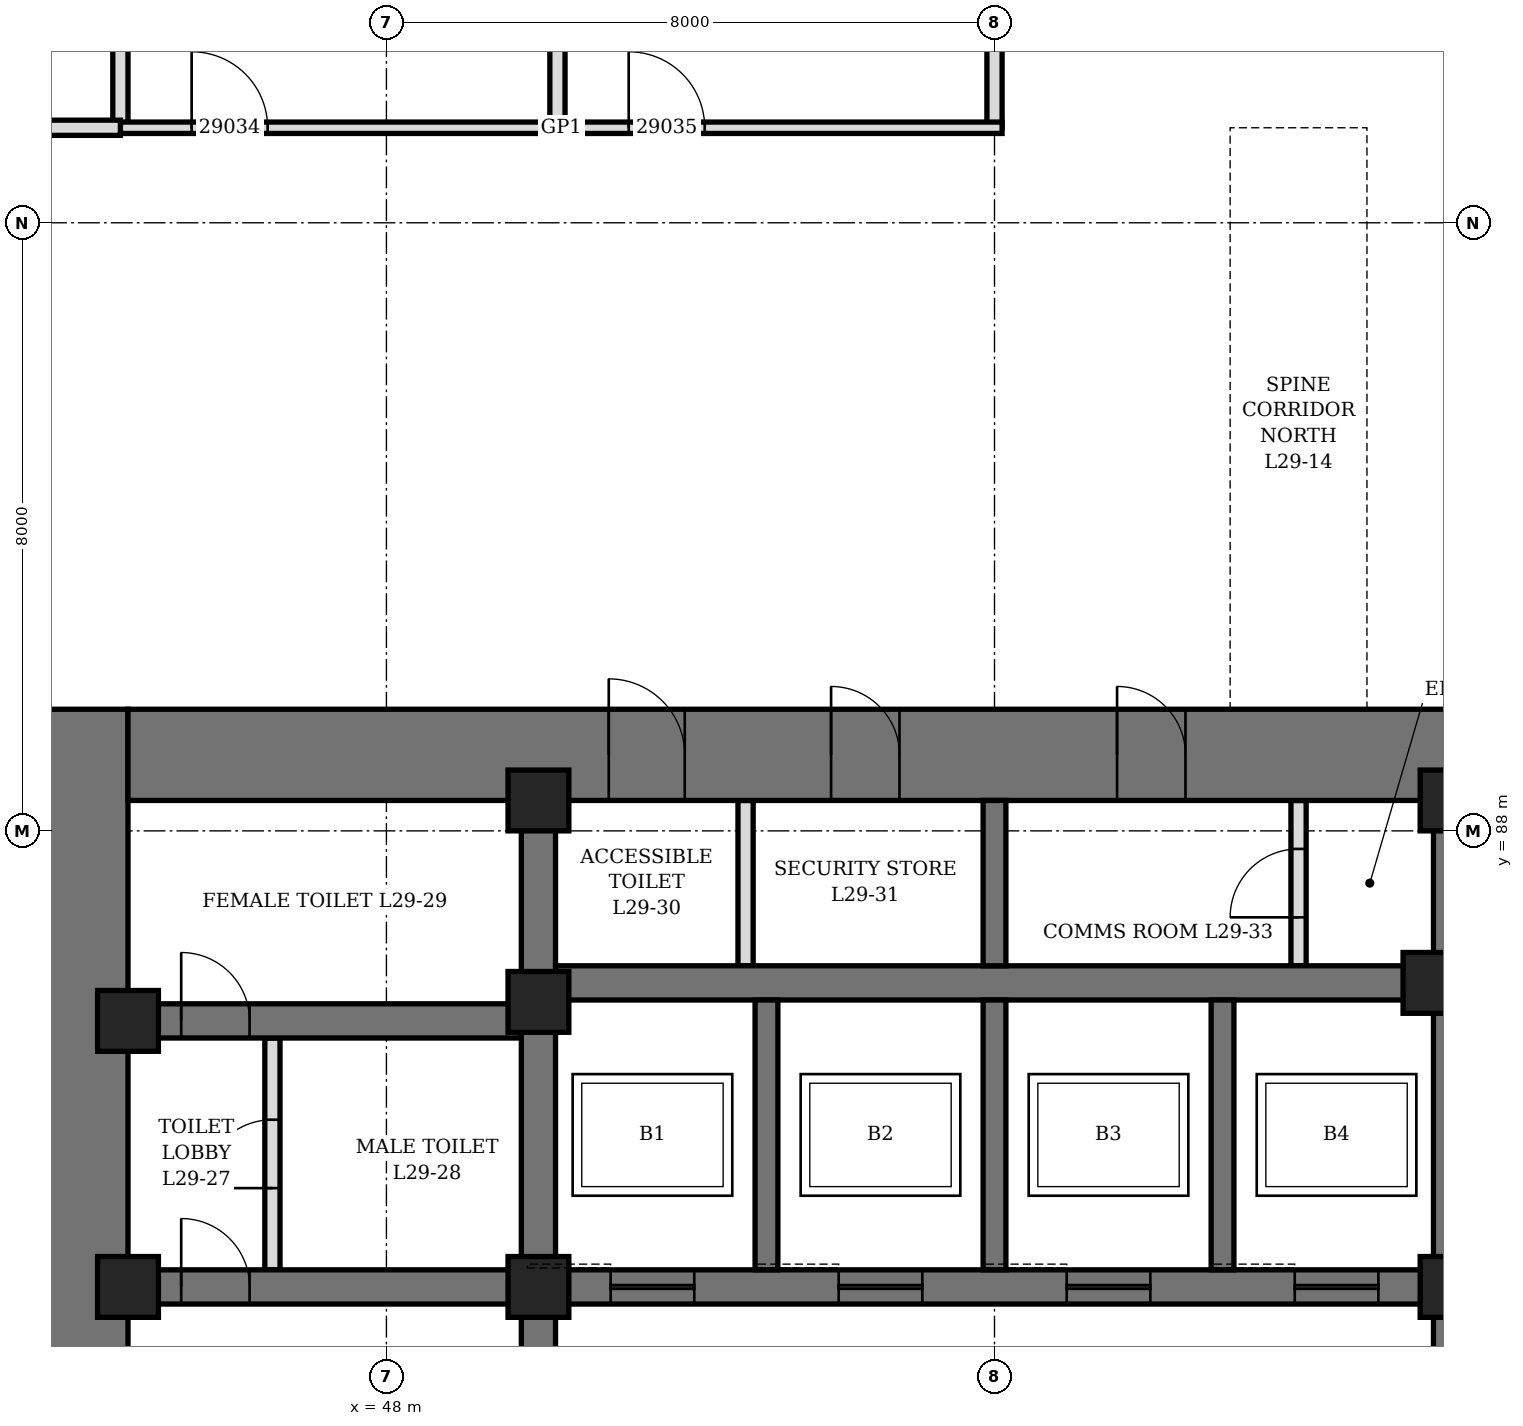
"""IFC4 building model, lengths in metres.
Left out: names, types, materials, properties, quantities, classifications, styles, units other than length and angle.
Written with IfcOpenShell. Run it as: python <this file> out.ifc"""

import sys

from ifc_helpers import new_model, si_unit, direction, frame, frame_2d, origin, origin_2d, place, context, subcontext, project, spatial, rectangle, hollow_rectangle, extrude, element, fill, save


model = new_model("IFC4")
c1 = context("Model", 3, precision=1e-05, world=origin(), true_north=direction((0.0, 1.0)))
c2 = subcontext(c1, "Body", "Model", "MODEL_VIEW")
j1 = project(units=[si_unit("LENGTHUNIT", "METRE"), si_unit("PLANEANGLEUNIT", "RADIAN")], contexts=[c1])
p1 = place(None, origin())
s1 = spatial("IfcSite", under=j1, at=p1, CompositionType="ELEMENT")
p2 = place(p1, origin())
s2 = spatial("IfcBuilding", under=s1, at=p2, CompositionType="ELEMENT")
p3 = place(p2, frame((0.0, 0.0, 133.3)))
s3 = spatial("IfcBuildingStorey", under=s2, at=p3, CompositionType="ELEMENT", Elevation=133.3)
p4 = place(p3, frame((44.0, 70.4, 0.0), z_axis=(0.0, 0.0, 1.0), x_axis=(0.0, 1.0, 0.0)))
e1 = element("IfcWall", 1, at=p4, inside=s3, PredefinedType="SHEAR", context=c2, shape_type="SweptSolid", body=[
    extrude(rectangle(XDim=19.2, YDim=1.2, at=frame_2d((9.6, 0.0))), origin(), (0.0, 0.0, 1.0), 4.2),
])
p5 = place(p4, frame((8.6, 0.0, 0.0)))
e2 = element("IfcOpeningElement", 2, at=p5, cuts=e1, PredefinedType="OPENING", context=c2, shape_type="SweptSolid", body=[
    extrude(rectangle(XDim=2.0, YDim=2.4, at=frame_2d((1.0, 1.2))), frame((0.0, 0.61, 0.0), z_axis=(0.0, -1.0, 0.0), x_axis=(1.0, 0.0, 0.0)), (0.0, 0.0, 1.0), 1.22),
])
p6 = place(p3, frame((44.6, 89.0, 0.0), z_axis=(0.0, 0.0, 1.0), x_axis=(1.0, 0.0, 0.0)))
e3 = element("IfcWall", 3, at=p6, inside=s3, PredefinedType="SHEAR", context=c2, shape_type="SweptSolid", body=[
    extrude(rectangle(XDim=22.8, YDim=1.2, at=frame_2d((11.4, 0.0))), origin(), (0.0, 0.0, 1.0), 4.2),
])
p7 = place(p6, frame((6.325, 0.0, 0.0)))
e4 = element("IfcOpeningElement", 4, at=p7, cuts=e3, PredefinedType="OPENING", context=c2, shape_type="SweptSolid", body=[
    extrude(rectangle(XDim=1.0, YDim=2.1, at=frame_2d((0.5, 1.05))), frame((0.0, 0.61, 0.0), z_axis=(0.0, -1.0, 0.0), x_axis=(1.0, 0.0, 0.0)), (0.0, 0.0, 1.0), 1.22),
])
p8 = place(p6, frame((9.25, 0.0, 0.0)))
e5 = element("IfcOpeningElement", 5, at=p8, cuts=e3, PredefinedType="OPENING", context=c2, shape_type="SweptSolid", body=[
    extrude(rectangle(XDim=0.9, YDim=2.1, at=frame_2d((0.45, 1.05))), frame((0.0, 0.61, 0.0), z_axis=(0.0, -1.0, 0.0), x_axis=(1.0, 0.0, 0.0)), (0.0, 0.0, 1.0), 1.22),
])
p9 = place(p6, frame((13.012, 0.0, 0.0)))
e6 = element("IfcOpeningElement", 6, at=p9, cuts=e3, PredefinedType="OPENING", context=c2, shape_type="SweptSolid", body=[
    extrude(rectangle(XDim=0.9, YDim=2.1, at=frame_2d((0.45, 1.05))), frame((0.0, 0.61, 0.0), z_axis=(0.0, -1.0, 0.0), x_axis=(1.0, 0.0, 0.0)), (0.0, 0.0, 1.0), 1.22),
])
p10 = place(p3, frame((50.0, 71.6, 0.0), z_axis=(0.0, 0.0, 1.0), x_axis=(0.0, 1.0, 0.0)))
e7 = element("IfcWall", 7, at=p10, inside=s3, PredefinedType="SHEAR", context=c2, shape_type="SweptSolid", body=[
    extrude(rectangle(XDim=16.8, YDim=0.45, at=frame_2d((8.4, 0.0))), origin(), (0.0, 0.0, 1.0), 4.2),
])
p11 = place(p10, frame((7.5, 0.0, 0.0)))
e8 = element("IfcOpeningElement", 8, at=p11, cuts=e7, PredefinedType="OPENING", context=c2, shape_type="SweptSolid", body=[
    extrude(rectangle(XDim=1.8, YDim=2.4, at=frame_2d((0.9, 1.2))), frame((0.0, 0.235, 0.0), z_axis=(0.0, -1.0, 0.0), x_axis=(1.0, 0.0, 0.0)), (0.0, 0.0, 1.0), 0.47),
])
p12 = place(p3, frame((62.0, 71.6, 0.0), z_axis=(0.0, 0.0, 1.0), x_axis=(0.0, 1.0, 0.0)))
e9 = element("IfcWall", 9, at=p12, inside=s3, PredefinedType="SHEAR", context=c2, shape_type="SweptSolid", body=[
    extrude(rectangle(XDim=16.8, YDim=0.45, at=frame_2d((8.4, 0.0))), origin(), (0.0, 0.0, 1.0), 4.2),
])
p13 = place(p12, frame((7.5, 0.0, 0.0)))
e10 = element("IfcOpeningElement", 10, at=p13, cuts=e9, PredefinedType="OPENING", context=c2, shape_type="SweptSolid", body=[
    extrude(rectangle(XDim=1.8, YDim=2.4, at=frame_2d((0.9, 1.2))), frame((0.0, 0.235, 0.0), z_axis=(0.0, -1.0, 0.0), x_axis=(1.0, 0.0, 0.0)), (0.0, 0.0, 1.0), 0.47),
])
p14 = place(p3, frame((44.6, 82.0, 0.0), z_axis=(0.0, 0.0, 1.0), x_axis=(1.0, 0.0, 0.0)))
e11 = element("IfcWall", 11, at=p14, inside=s3, PredefinedType="SHEAR", context=c2, shape_type="SweptSolid", body=[
    extrude(rectangle(XDim=5.175, YDim=0.45, at=frame_2d((2.587, 0.0))), origin(), (0.0, 0.0, 1.0), 4.2),
])
p15 = place(p14, frame((0.7, 0.0, 0.0)))
e12 = element("IfcOpeningElement", 12, at=p15, cuts=e11, PredefinedType="OPENING", context=c2, shape_type="SweptSolid", body=[
    extrude(rectangle(XDim=0.9, YDim=2.1, at=frame_2d((0.45, 1.05))), frame((0.0, 0.235, 0.0), z_axis=(0.0, -1.0, 0.0), x_axis=(1.0, 0.0, 0.0)), (0.0, 0.0, 1.0), 0.47),
])
p16 = place(p3, frame((44.6, 85.5, 0.0), z_axis=(0.0, 0.0, 1.0), x_axis=(1.0, 0.0, 0.0)))
e13 = element("IfcWall", 13, at=p16, inside=s3, PredefinedType="SHEAR", context=c2, shape_type="SweptSolid", body=[
    extrude(rectangle(XDim=5.175, YDim=0.45, at=frame_2d((2.587, 0.0))), origin(), (0.0, 0.0, 1.0), 4.2),
])
p17 = place(p16, frame((0.7, 0.0, 0.0)))
e14 = element("IfcOpeningElement", 14, at=p17, cuts=e13, PredefinedType="OPENING", context=c2, shape_type="SweptSolid", body=[
    extrude(rectangle(XDim=0.9, YDim=2.1, at=frame_2d((0.45, 1.05))), frame((0.0, 0.235, 0.0), z_axis=(0.0, -1.0, 0.0), x_axis=(1.0, 0.0, 0.0)), (0.0, 0.0, 1.0), 0.47),
])
p18 = place(p3, frame((50.225, 82.0, 0.0), z_axis=(0.0, 0.0, 1.0), x_axis=(1.0, 0.0, 0.0)))
e15 = element("IfcWall", 15, at=p18, inside=s3, PredefinedType="SHEAR", context=c2, shape_type="SweptSolid", body=[
    extrude(rectangle(XDim=11.55, YDim=0.45, at=frame_2d((5.775, 0.0))), origin(), (0.0, 0.0, 1.0), 4.2),
])
p19 = place(p18, frame((0.725, 0.0, 0.0)))
e16 = element("IfcOpeningElement", 16, at=p19, cuts=e15, PredefinedType="OPENING", context=c2, shape_type="SweptSolid", body=[
    extrude(rectangle(XDim=1.1, YDim=2.2, at=frame_2d((0.55, 1.1))), frame((0.0, 0.235, 0.0), z_axis=(0.0, -1.0, 0.0), x_axis=(1.0, 0.0, 0.0)), (0.0, 0.0, 1.0), 0.47),
])
p20 = place(p18, frame((3.725, 0.0, 0.0)))
e17 = element("IfcOpeningElement", 17, at=p20, cuts=e15, PredefinedType="OPENING", context=c2, shape_type="SweptSolid", body=[
    extrude(rectangle(XDim=1.1, YDim=2.2, at=frame_2d((0.55, 1.1))), frame((0.0, 0.235, 0.0), z_axis=(0.0, -1.0, 0.0), x_axis=(1.0, 0.0, 0.0)), (0.0, 0.0, 1.0), 0.47),
])
p21 = place(p18, frame((6.725, 0.0, 0.0)))
e18 = element("IfcOpeningElement", 18, at=p21, cuts=e15, PredefinedType="OPENING", context=c2, shape_type="SweptSolid", body=[
    extrude(rectangle(XDim=1.1, YDim=2.2, at=frame_2d((0.55, 1.1))), frame((0.0, 0.235, 0.0), z_axis=(0.0, -1.0, 0.0), x_axis=(1.0, 0.0, 0.0)), (0.0, 0.0, 1.0), 0.47),
])
p22 = place(p18, frame((9.725, 0.0, 0.0)))
e19 = element("IfcOpeningElement", 19, at=p22, cuts=e15, PredefinedType="OPENING", context=c2, shape_type="SweptSolid", body=[
    extrude(rectangle(XDim=1.1, YDim=2.2, at=frame_2d((0.55, 1.1))), frame((0.0, 0.235, 0.0), z_axis=(0.0, -1.0, 0.0), x_axis=(1.0, 0.0, 0.0)), (0.0, 0.0, 1.0), 0.47),
])
p23 = place(p3, frame((50.225, 86.0, 0.0), z_axis=(0.0, 0.0, 1.0), x_axis=(1.0, 0.0, 0.0)))
e20 = element("IfcWall", 20, at=p23, inside=s3, PredefinedType="SHEAR", context=c2, shape_type="SweptSolid", body=[
    extrude(rectangle(XDim=11.55, YDim=0.45, at=frame_2d((5.775, 0.0))), origin(), (0.0, 0.0, 1.0), 4.2),
])
for number, where, z_axis, x_axis in (
    (21, (53.0, 82.225, 0.0), (0.0, 0.0, 1.0), (0.0, 1.0, 0.0)),
    (22, (56.0, 82.225, 0.0), (0.0, 0.0, 1.0), (0.0, 1.0, 0.0)),
    (23, (59.0, 82.225, 0.0), (0.0, 0.0, 1.0), (0.0, 1.0, 0.0)),
):
    element("IfcWall", number, at=place(p3, frame(where, z_axis=z_axis, x_axis=x_axis)), inside=s3, PredefinedType="SHEAR", context=c2, shape_type="SweptSolid", body=[
        extrude(rectangle(XDim=3.55, YDim=0.3, at=frame_2d((1.775, 0.0))), origin(), (0.0, 0.0, 1.0), 4.2),
    ])
p24 = place(p3, frame((56.0, 86.225, 0.0), z_axis=(0.0, 0.0, 1.0), x_axis=(0.0, 1.0, 0.0)))
e24 = element("IfcWall", 24, at=p24, inside=s3, PredefinedType="SHEAR", context=c2, shape_type="SweptSolid", body=[
    extrude(rectangle(XDim=2.175, YDim=0.3, at=frame_2d((1.087, 0.0))), origin(), (0.0, 0.0, 1.0), 4.2),
])
for number, where, z_axis, x_axis in (
    (25, (44.6, 82.0, 0.0), (0.0, 0.0, 1.0), (1.0, 0.0, 0.0)),
    (26, (44.6, 85.5, 0.0), (0.0, 0.0, 1.0), (1.0, 0.0, 0.0)),
    (27, (50.0, 82.0, 0.0), (0.0, 0.0, 1.0), (1.0, 0.0, 0.0)),
    (28, (50.0, 85.75, 0.0), (0.0, 0.0, 1.0), (1.0, 0.0, 0.0)),
    (29, (50.0, 88.4, 0.0), (0.0, 0.0, 1.0), (1.0, 0.0, 0.0)),
    (30, (61.775, 86.0, 0.0), (0.0, 0.0, 1.0), (1.0, 0.0, 0.0)),
    (31, (62.0, 82.0, 0.0), (0.0, 0.0, 1.0), (1.0, 0.0, 0.0)),
    (32, (62.0, 88.4, 0.0), (0.0, 0.0, 1.0), (1.0, 0.0, 0.0)),
):
    element("IfcColumn", number, at=place(p3, frame(where, z_axis=z_axis, x_axis=x_axis)), inside=s3, PredefinedType="COLUMN", context=c2, shape_type="SweptSolid", body=[
        extrude(hollow_rectangle(XDim=0.8, YDim=0.8, WallThickness=0.1, at=origin_2d()), origin(), (0.0, 0.0, 1.0), 4.2),
    ])
p25 = place(p3, frame((46.5, 82.225, 0.0), z_axis=(0.0, 0.0, 1.0), x_axis=(0.0, 1.0, 0.0)))
e33 = element("IfcWall", 33, at=p25, inside=s3, PredefinedType="PARTITIONING", context=c2, shape_type="SweptSolid", body=[
    extrude(rectangle(XDim=3.05, YDim=0.2, at=frame_2d((1.525, 0.0))), origin(), (0.0, 0.0, 1.0), 4.04),
])
p26 = place(p25, frame((1.075, 0.0, 0.0)))
e34 = element("IfcOpeningElement", 34, at=p26, cuts=e33, PredefinedType="OPENING", context=c2, shape_type="SweptSolid", body=[
    extrude(rectangle(XDim=0.9, YDim=2.1, at=frame_2d((0.45, 1.05))), frame((0.0, 0.11, 0.0), z_axis=(0.0, -1.0, 0.0), x_axis=(1.0, 0.0, 0.0)), (0.0, 0.0, 1.0), 0.22),
])
p27 = place(p3, frame((52.725, 86.225, 0.0), z_axis=(0.0, 0.0, 1.0), x_axis=(0.0, 1.0, 0.0)))
e35 = element("IfcWall", 35, at=p27, inside=s3, PredefinedType="PARTITIONING", context=c2, shape_type="SweptSolid", body=[
    extrude(rectangle(XDim=2.175, YDim=0.2, at=frame_2d((1.087, 0.0))), origin(), (0.0, 0.0, 1.0), 4.04),
])
p28 = place(p3, frame((60.0, 86.225, 0.0), z_axis=(0.0, 0.0, 1.0), x_axis=(0.0, 1.0, 0.0)))
e36 = element("IfcWall", 36, at=p28, inside=s3, PredefinedType="PARTITIONING", context=c2, shape_type="SweptSolid", body=[
    extrude(rectangle(XDim=2.175, YDim=0.2, at=frame_2d((1.087, 0.0))), origin(), (0.0, 0.0, 1.0), 4.04),
])
p29 = place(p28, frame((0.637, 0.0, 0.0)))
e37 = element("IfcOpeningElement", 37, at=p29, cuts=e36, PredefinedType="OPENING", context=c2, shape_type="SweptSolid", body=[
    extrude(rectangle(XDim=0.9, YDim=2.1, at=frame_2d((0.45, 1.05))), frame((0.0, 0.11, 0.0), z_axis=(0.0, -1.0, 0.0), x_axis=(1.0, 0.0, 0.0)), (0.0, 0.0, 1.0), 0.22),
])
p30 = place(p3, frame((44.5, 97.25, 0.0), z_axis=(0.0, 0.0, 1.0), x_axis=(0.0, 1.0, 0.0)))
e38 = element("IfcWall", 38, at=p30, inside=s3, PredefinedType="PARTITIONING", context=c2, shape_type="SweptSolid", body=[
    extrude(rectangle(XDim=4.8, YDim=0.2, at=frame_2d((2.4, 0.0))), origin(), (0.0, 0.0, 1.0), 2.74),
])
for number, where, z_axis, x_axis in (
    (39, (50.25, 97.25, 0.0), (0.0, 0.0, 1.0), (0.0, 1.0, 0.0)),
    (40, (56.0, 97.25, 0.0), (0.0, 0.0, 1.0), (0.0, 1.0, 0.0)),
):
    element("IfcWall", number, at=place(p3, frame(where, z_axis=z_axis, x_axis=x_axis)), inside=s3, PredefinedType="PARTITIONING", context=c2, shape_type="SweptSolid", body=[
        extrude(rectangle(XDim=4.8, YDim=0.2, at=frame_2d((2.4, 0.0))), origin(), (0.0, 0.0, 1.0), 3.278),
    ])
p31 = place(p3, frame((44.5, 97.25, 0.0), z_axis=(0.0, 0.0, 1.0), x_axis=(1.0, 0.0, 0.0)))
e41 = element("IfcWall", 41, at=p31, inside=s3, PredefinedType="PARTITIONING", context=c2, shape_type="SweptSolid", body=[
    extrude(rectangle(XDim=11.6, YDim=0.15, at=frame_2d((5.8, 0.0))), origin(), (0.0, 0.0, 1.0), 4.04),
])
p32 = place(p31, frame((0.938, 0.0, 0.0)))
e42 = element("IfcOpeningElement", 42, at=p32, cuts=e41, PredefinedType="OPENING", context=c2, shape_type="SweptSolid", body=[
    extrude(rectangle(XDim=1.0, YDim=2.4, at=frame_2d((0.5, 1.2))), frame((0.0, 0.085, 0.0), z_axis=(0.0, -1.0, 0.0), x_axis=(1.0, 0.0, 0.0)), (0.0, 0.0, 1.0), 0.17),
])
p33 = place(p31, frame((6.688, 0.0, 0.0)))
e43 = element("IfcOpeningElement", 43, at=p33, cuts=e41, PredefinedType="OPENING", context=c2, shape_type="SweptSolid", body=[
    extrude(rectangle(XDim=1.0, YDim=2.4, at=frame_2d((0.5, 1.2))), frame((0.0, 0.085, 0.0), z_axis=(0.0, -1.0, 0.0), x_axis=(1.0, 0.0, 0.0)), (0.0, 0.0, 1.0), 0.17),
])
p34 = place(p3, frame((41.625, 97.25, 0.0), z_axis=(0.0, 0.0, 1.0), x_axis=(1.0, 0.0, 0.0)))
e44 = element("IfcWall", 44, at=p34, inside=s3, PredefinedType="PARTITIONING", context=c2, shape_type="SweptSolid", body=[
    extrude(rectangle(XDim=2.875, YDim=0.2, at=frame_2d((1.438, 0.0))), origin(), (0.0, 0.0, 1.0), 4.04),
])
p35 = place(p34, frame((0.938, 0.0, 0.0)))
e45 = element("IfcOpeningElement", 45, at=p35, cuts=e44, PredefinedType="OPENING", context=c2, shape_type="SweptSolid", body=[
    extrude(rectangle(XDim=1.0, YDim=2.1, at=frame_2d((0.5, 1.05))), frame((0.0, 0.11, 0.0), z_axis=(0.0, -1.0, 0.0), x_axis=(1.0, 0.0, 0.0)), (0.0, 0.0, 1.0), 0.22),
])
p36 = place(p15, origin())
e46 = element("IfcDoor", 46, at=p36, inside=s3, OperationType="SINGLE_SWING_LEFT", PredefinedType="DOOR", context=c2, shape_type="SweptSolid", body=[
    extrude(rectangle(XDim=0.9, YDim=2.1, at=frame_2d((0.45, 1.05))), frame((0.0, 0.225, 0.0), z_axis=(0.0, -1.0, 0.0), x_axis=(1.0, 0.0, 0.0)), (0.0, 0.0, 1.0), 0.449),
])
fill(e12, e46)
p37 = place(p26, origin())
e47 = element("IfcDoor", 47, at=p37, inside=s3, OperationType="SINGLE_SWING_RIGHT", PredefinedType="DOOR", context=c2, shape_type="SweptSolid", body=[
    extrude(rectangle(XDim=0.9, YDim=2.1, at=frame_2d((0.45, 1.05))), frame((0.0, 0.1, 0.0), z_axis=(0.0, -1.0, 0.0), x_axis=(1.0, 0.0, 0.0)), (0.0, 0.0, 1.0), 0.199),
])
fill(e34, e47)
p38 = place(p17, origin())
e48 = element("IfcDoor", 48, at=p38, inside=s3, OperationType="SINGLE_SWING_RIGHT", PredefinedType="DOOR", context=c2, shape_type="SweptSolid", body=[
    extrude(rectangle(XDim=0.9, YDim=2.1, at=frame_2d((0.45, 1.05))), frame((0.0, 0.225, 0.0), z_axis=(0.0, -1.0, 0.0), x_axis=(1.0, 0.0, 0.0)), (0.0, 0.0, 1.0), 0.449),
])
fill(e14, e48)
p39 = place(p7, origin())
e49 = element("IfcDoor", 49, at=p39, inside=s3, OperationType="SINGLE_SWING_LEFT", PredefinedType="DOOR", context=c2, shape_type="SweptSolid", body=[
    extrude(rectangle(XDim=1.0, YDim=2.1, at=frame_2d((0.5, 1.05))), frame((0.0, 0.35, 0.0), z_axis=(0.0, -1.0, 0.0), x_axis=(1.0, 0.0, 0.0)), (0.0, 0.0, 1.0), 0.7),
])
fill(e4, e49)
p40 = place(p8, origin())
e50 = element("IfcDoor", 50, at=p40, inside=s3, OperationType="SINGLE_SWING_LEFT", PredefinedType="DOOR", context=c2, shape_type="SweptSolid", body=[
    extrude(rectangle(XDim=0.9, YDim=2.1, at=frame_2d((0.45, 1.05))), frame((0.0, 0.35, 0.0), z_axis=(0.0, -1.0, 0.0), x_axis=(1.0, 0.0, 0.0)), (0.0, 0.0, 1.0), 0.7),
])
fill(e5, e50)
p41 = place(p9, origin())
e51 = element("IfcDoor", 51, at=p41, inside=s3, OperationType="SINGLE_SWING_LEFT", PredefinedType="DOOR", context=c2, shape_type="SweptSolid", body=[
    extrude(rectangle(XDim=0.9, YDim=2.1, at=frame_2d((0.45, 1.05))), frame((0.0, 0.35, 0.0), z_axis=(0.0, -1.0, 0.0), x_axis=(1.0, 0.0, 0.0)), (0.0, 0.0, 1.0), 0.7),
])
fill(e6, e51)
p42 = place(p29, origin())
e52 = element("IfcDoor", 52, at=p42, inside=s3, OperationType="SINGLE_SWING_LEFT", PredefinedType="DOOR", context=c2, shape_type="SweptSolid", body=[
    extrude(rectangle(XDim=0.9, YDim=2.1, at=frame_2d((0.45, 1.05))), frame((0.0, 0.1, 0.0), z_axis=(0.0, -1.0, 0.0), x_axis=(1.0, 0.0, 0.0)), (0.0, 0.0, 1.0), 0.199),
])
fill(e37, e52)
p43 = place(p19, origin())
e53 = element("IfcDoor", 53, at=p43, inside=s3, OperationType="SLIDING_TO_LEFT", PredefinedType="DOOR", context=c2, shape_type="SweptSolid", body=[
    extrude(rectangle(XDim=1.1, YDim=2.2, at=frame_2d((0.55, 1.1))), frame((0.0, 0.225, 0.0), z_axis=(0.0, -1.0, 0.0), x_axis=(1.0, 0.0, 0.0)), (0.0, 0.0, 1.0), 0.449),
])
fill(e16, e53)
p44 = place(p20, origin())
e54 = element("IfcDoor", 54, at=p44, inside=s3, OperationType="SLIDING_TO_LEFT", PredefinedType="DOOR", context=c2, shape_type="SweptSolid", body=[
    extrude(rectangle(XDim=1.1, YDim=2.2, at=frame_2d((0.55, 1.1))), frame((0.0, 0.225, 0.0), z_axis=(0.0, -1.0, 0.0), x_axis=(1.0, 0.0, 0.0)), (0.0, 0.0, 1.0), 0.449),
])
fill(e17, e54)
p45 = place(p21, origin())
e55 = element("IfcDoor", 55, at=p45, inside=s3, OperationType="SLIDING_TO_LEFT", PredefinedType="DOOR", context=c2, shape_type="SweptSolid", body=[
    extrude(rectangle(XDim=1.1, YDim=2.2, at=frame_2d((0.55, 1.1))), frame((0.0, 0.225, 0.0), z_axis=(0.0, -1.0, 0.0), x_axis=(1.0, 0.0, 0.0)), (0.0, 0.0, 1.0), 0.449),
])
fill(e18, e55)
p46 = place(p22, origin())
e56 = element("IfcDoor", 56, at=p46, inside=s3, OperationType="SLIDING_TO_LEFT", PredefinedType="DOOR", context=c2, shape_type="SweptSolid", body=[
    extrude(rectangle(XDim=1.1, YDim=2.2, at=frame_2d((0.55, 1.1))), frame((0.0, 0.225, 0.0), z_axis=(0.0, -1.0, 0.0), x_axis=(1.0, 0.0, 0.0)), (0.0, 0.0, 1.0), 0.449),
])
fill(e19, e56)
p47 = place(p32, origin())
e57 = element("IfcDoor", 57, at=p47, inside=s3, OperationType="SINGLE_SWING_RIGHT", PredefinedType="DOOR", context=c2, shape_type="SweptSolid", body=[
    extrude(rectangle(XDim=1.0, YDim=2.4, at=frame_2d((0.5, 1.2))), frame((0.0, 0.075, 0.0), z_axis=(0.0, -1.0, 0.0), x_axis=(1.0, 0.0, 0.0)), (0.0, 0.0, 1.0), 0.149),
])
fill(e42, e57)
p48 = place(p33, origin())
e58 = element("IfcDoor", 58, at=p48, inside=s3, OperationType="SINGLE_SWING_RIGHT", PredefinedType="DOOR", context=c2, shape_type="SweptSolid", body=[
    extrude(rectangle(XDim=1.0, YDim=2.4, at=frame_2d((0.5, 1.2))), frame((0.0, 0.075, 0.0), z_axis=(0.0, -1.0, 0.0), x_axis=(1.0, 0.0, 0.0)), (0.0, 0.0, 1.0), 0.149),
])
fill(e43, e58)
save(model, sys.argv[1])
